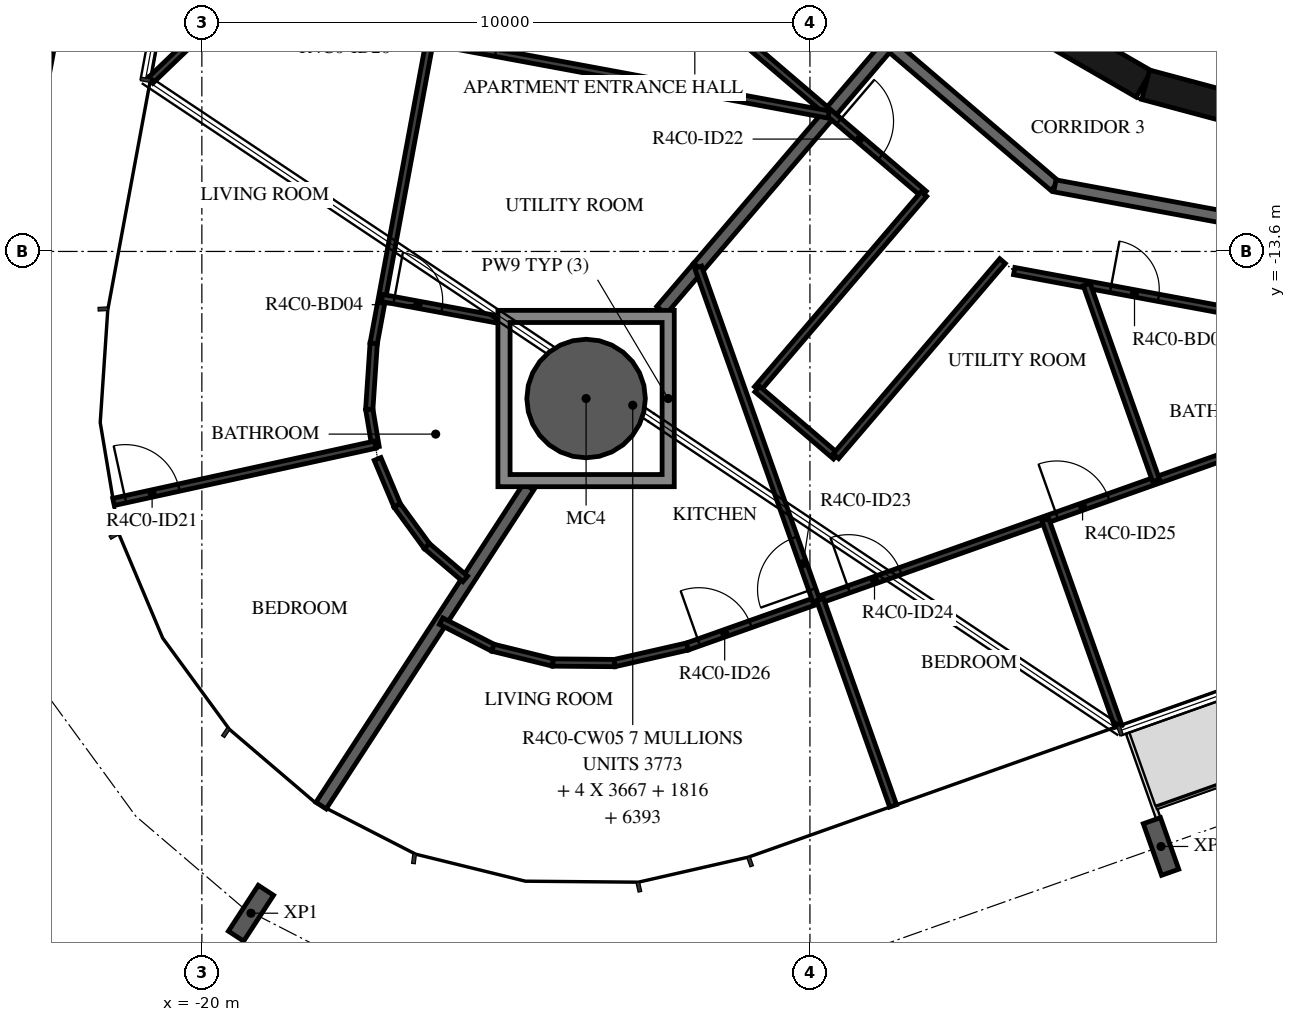
"""IFC4 building model, lengths in metres.
Left out: names, types, materials, properties, quantities, classifications, styles, units other than length and angle.
Written with IfcOpenShell. Run it as: python <this file> out.ifc"""

import sys

from ifc_helpers import new_model, si_unit, direction, frame, frame_2d, origin, origin_2d, place, context, subcontext, project, spatial, polyline, rectangle, hollow_circle, i_section, outline, extrude, element, fill, save


model = new_model("IFC4")
c1 = context("Model", 3, precision=1e-05, world=origin(), true_north=direction((0.0, 1.0)))
c2 = subcontext(c1, "Body", "Model", "MODEL_VIEW")
j1 = project(units=[si_unit("LENGTHUNIT", "METRE"), si_unit("PLANEANGLEUNIT", "RADIAN")], contexts=[c1])
p1 = place(None, origin())
s1 = spatial("IfcSite", under=j1, at=p1, CompositionType="ELEMENT")
p2 = place(p1, origin())
s2 = spatial("IfcBuilding", under=s1, at=p2, CompositionType="ELEMENT")
p3 = place(p2, frame((0.0, 0.0, 179.7)))
s3 = spatial("IfcBuildingStorey", under=s2, at=p3, CompositionType="ELEMENT", Elevation=179.7)
p4 = place(p3, frame((-13.681, -16.019, -0.38), z_axis=(0.0, 0.0, 1.0), x_axis=(1.0, 0.0, 0.0)))
e1 = element("IfcColumn", 1, at=p4, inside=s3, PredefinedType="COLUMN", context=c2, shape_type="SweptSolid", body=[
    extrude(hollow_circle(Radius=0.975, WallThickness=0.045, at=origin_2d()), origin(), (0.0, 0.0, 1.0), 2.616),
])
for number, where, z_axis, x_axis in (
    (2, (-22.914, -10.409, -0.38), (0.0, 0.0, 1.0), (0.182, 0.983, 0.0)),
    (3, (-19.192, -24.483, -0.38), (0.0, 0.0, 1.0), (-0.838, 0.546, 0.0)),
    (4, (-4.226, -23.385, -0.38), (0.0, 0.0, 1.0), (-0.943, -0.334, 0.0)),
):
    element("IfcColumn", number, at=place(p3, frame(where, z_axis=z_axis, x_axis=x_axis)), inside=s3, PredefinedType="COLUMN", context=c2, shape_type="SweptSolid", body=[
        extrude(i_section(OverallWidth=0.3, OverallDepth=0.9, WebThickness=0.019, FlangeThickness=0.035, FilletRadius=0.03, at=origin_2d()), origin(), (0.0, 0.0, 1.0), 2.616),
    ])
for number, where, z_axis, x_axis in (
    (5, (-7.137, -9.329, 0.0), (0.0, 0.0, 1.0), (0.866, -0.5, 0.0)),
    (6, (-4.479, -10.858, 0.0), (0.0, 0.0, 1.0), (0.966, -0.259, 0.0)),
):
    element("IfcWall", number, at=place(p3, frame(where, z_axis=z_axis, x_axis=x_axis)), inside=s3, PredefinedType="SHEAR", context=c2, shape_type="SweptSolid", body=[
        extrude(rectangle(XDim=3.033, YDim=0.5, at=frame_2d((1.516, 0.0))), origin(), (0.0, 0.0, 1.0), 3.05),
    ])
p5 = place(p3, frame((-11.433, -7.858, 0.0), z_axis=(0.0, 0.0, 1.0), x_axis=(0.760412154545, -0.649440801937, 0.0)))
e7 = element("IfcWall", 7, at=p5, inside=s3, PredefinedType="STANDARD", context=c2, shape_type="SweptSolid", body=[
    extrude(rectangle(XDim=7.181, YDim=0.2, at=frame_2d((3.59, 0.0))), origin(), (0.0, 0.0, 1.0), 3.05),
])
p6 = place(p5, frame((2.39, 0.0, 0.0)))
e8 = element("IfcOpeningElement", 8, at=p6, cuts=e7, PredefinedType="OPENING", context=c2, shape_type="SweptSolid", body=[
    extrude(rectangle(XDim=1.0, YDim=2.1, at=frame_2d((0.5, 1.05))), frame((0.0, 0.11, 0.0), z_axis=(0.0, -1.0, 0.0), x_axis=(1.0, 0.0, 0.0)), (0.0, 0.0, 1.0), 0.22),
])
p7 = place(p3, frame((-5.972, -12.521, 0.0), z_axis=(0.0, 0.0, 1.0), x_axis=(0.983256068163, -0.18222926335, 0.0)))
e9 = element("IfcWall", 9, at=p7, inside=s3, PredefinedType="STANDARD", context=c2, shape_type="SweptSolid", body=[
    extrude(rectangle(XDim=7.181, YDim=0.2, at=frame_2d((3.59, 0.0))), origin(), (0.0, 0.0, 1.0), 3.05),
])
p8 = place(p7, frame((4.7, 0.0, 0.0)))
e10 = element("IfcOpeningElement", 10, at=p8, cuts=e9, PredefinedType="OPENING", context=c2, shape_type="SweptSolid", body=[
    extrude(rectangle(XDim=1.0, YDim=2.1, at=frame_2d((0.5, 1.05))), frame((0.0, 0.11, 0.0), z_axis=(0.0, -1.0, 0.0), x_axis=(1.0, 0.0, 0.0)), (0.0, 0.0, 1.0), 0.22),
])
p9 = place(p3, frame((-11.838, -13.86, 0.0), z_axis=(0.0, 0.0, 1.0), x_axis=(0.64944503311, 0.760408540831, 0.0)))
e11 = element("IfcWall", 11, at=p9, inside=s3, PredefinedType="STANDARD", context=c2, shape_type="SweptSolid", body=[
    extrude(rectangle(XDim=4.827, YDim=0.2, at=frame_2d((2.414, 0.0))), origin(), (0.0, 0.0, 1.0), 3.05),
])
p10 = place(p3, frame((-12.443, -14.569, 0.0), z_axis=(0.0, 0.0, 1.0), x_axis=(0.649517408851, 0.760346720648, 0.0)))
e12 = element("IfcWall", 12, at=p10, inside=s3, PredefinedType="STANDARD", context=c2, shape_type="SweptSolid", body=[
    extrude(rectangle(XDim=0.932, YDim=0.2, at=frame_2d((0.466, 0.0))), origin(), (0.0, 0.0, 1.0), 3.05),
])
p11 = place(p3, frame((-18.04, -22.713, 0.0), z_axis=(0.0, 0.0, 1.0), x_axis=(0.545628572271, 0.838027124335, 0.0)))
e13 = element("IfcWall", 13, at=p11, inside=s3, PredefinedType="STANDARD", context=c2, shape_type="SweptSolid", body=[
    extrude(rectangle(XDim=6.258, YDim=0.2, at=frame_2d((3.129, 0.0))), origin(), (0.0, 0.0, 1.0), 3.05),
])
p12 = place(p3, frame((-12.713, -8.737, 0.0), z_axis=(0.0, 0.0, 1.0), x_axis=(0.760432387723, -0.649417110725, 0.0)))
e14 = element("IfcWall", 14, at=p12, inside=s3, PredefinedType="PARTITIONING", context=c2, shape_type="SweptSolid", body=[
    extrude(rectangle(XDim=6.032, YDim=0.12, at=frame_2d((3.016, 0.0))), origin(), (0.0, 0.0, 1.0), 3.05),
])
p13 = place(p12, frame((4.192, 0.0, 0.0)))
e15 = element("IfcOpeningElement", 15, at=p13, cuts=e14, PredefinedType="OPENING", context=c2, shape_type="SweptSolid", body=[
    extrude(rectangle(XDim=0.9, YDim=2.1, at=frame_2d((0.45, 1.05))), frame((0.0, 0.07, 0.0), z_axis=(0.0, -1.0, 0.0), x_axis=(1.0, 0.0, 0.0)), (0.0, 0.0, 1.0), 0.14),
])
p14 = place(p3, frame((-20.849, -10.792, 0.0), z_axis=(0.0, 0.0, 1.0), x_axis=(0.721364983662, 0.692555095531, 0.0)))
e16 = element("IfcWall", 16, at=p14, inside=s3, PredefinedType="PARTITIONING", context=c2, shape_type="SweptSolid", body=[
    extrude(rectangle(XDim=6.771, YDim=0.12, at=frame_2d((3.385, 0.0))), origin(), (0.0, 0.0, 1.0), 3.05),
])
p15 = place(p3, frame((-15.51, -6.13, 0.0), z_axis=(0.0, 0.0, 1.0), x_axis=(-0.182243361628, -0.98325345519, 0.0)))
e17 = element("IfcWall", 17, at=p15, inside=s3, PredefinedType="PARTITIONING", context=c2, shape_type="SweptSolid", body=[
    extrude(rectangle(XDim=9.134, YDim=0.12, at=frame_2d((4.567, 0.0))), origin(), (0.0, 0.0, 1.0), 3.05),
])
p16 = place(p15, frame((0.6, 0.0, 0.0)))
e18 = element("IfcOpeningElement", 18, at=p16, cuts=e17, PredefinedType="OPENING", context=c2, shape_type="SweptSolid", body=[
    extrude(rectangle(XDim=0.9, YDim=2.1, at=frame_2d((0.45, 1.05))), frame((0.0, 0.07, 0.0), z_axis=(0.0, -1.0, 0.0), x_axis=(1.0, 0.0, 0.0)), (0.0, 0.0, 1.0), 0.14),
])
p17 = place(p3, frame((-16.252, -10.133, 0.0), z_axis=(0.0, 0.0, 1.0), x_axis=(0.983256998026, -0.182224246005, 0.0)))
e19 = element("IfcWall", 19, at=p17, inside=s3, PredefinedType="PARTITIONING", context=c2, shape_type="SweptSolid", body=[
    extrude(rectangle(XDim=6.671, YDim=0.12, at=frame_2d((3.335, 0.0))), origin(), (0.0, 0.0, 1.0), 3.05),
])
p18 = place(p17, frame((0.2, 0.0, 0.0)))
e20 = element("IfcOpeningElement", 20, at=p18, cuts=e19, PredefinedType="OPENING", context=c2, shape_type="SweptSolid", body=[
    extrude(rectangle(XDim=0.9, YDim=2.1, at=frame_2d((0.45, 1.05))), frame((0.0, 0.07, 0.0), z_axis=(0.0, -1.0, 0.0), x_axis=(1.0, 0.0, 0.0)), (0.0, 0.0, 1.0), 0.14),
])
p19 = place(p3, frame((-17.143, -16.817, 0.0), z_axis=(0.0, 0.0, 1.0), x_axis=(-0.164964120994, 0.98629956848, 0.0)))
e21 = element("IfcWall", 21, at=p19, inside=s3, PredefinedType="PARTITIONING", context=c2, shape_type="SweptSolid", body=[
    extrude(rectangle(XDim=0.63, YDim=0.12, at=frame_2d((0.315, 0.0))), origin(), (0.0, 0.0, 1.0), 3.05),
])
p20 = place(p3, frame((-17.247, -16.195, 0.0), z_axis=(0.0, 0.0, 1.0), x_axis=(0.066712820538, 0.997772218282, 0.0)))
e22 = element("IfcWall", 22, at=p20, inside=s3, PredefinedType="PARTITIONING", context=c2, shape_type="SweptSolid", body=[
    extrude(rectangle(XDim=1.087, YDim=0.12, at=frame_2d((0.543, 0.0))), origin(), (0.0, 0.0, 1.0), 3.05),
])
p21 = place(p3, frame((-21.453, -17.719, 0.0), z_axis=(0.0, 0.0, 1.0), x_axis=(0.976887361549, 0.213754725903, 0.0)))
e23 = element("IfcWall", 23, at=p21, inside=s3, PredefinedType="PARTITIONING", context=c2, shape_type="SweptSolid", body=[
    extrude(rectangle(XDim=4.405, YDim=0.12, at=frame_2d((2.203, 0.0))), origin(), (0.0, 0.0, 1.0), 3.05),
])
p22 = place(p21, frame((0.2, 0.0, 0.0)))
e24 = element("IfcOpeningElement", 24, at=p22, cuts=e23, PredefinedType="OPENING", context=c2, shape_type="SweptSolid", body=[
    extrude(rectangle(XDim=0.9, YDim=2.1, at=frame_2d((0.45, 1.05))), frame((0.0, 0.07, 0.0), z_axis=(0.0, -1.0, 0.0), x_axis=(1.0, 0.0, 0.0)), (0.0, 0.0, 1.0), 0.14),
])
p23 = place(p3, frame((-17.036, -14.366, 0.0), z_axis=(0.0, 0.0, 1.0), x_axis=(0.983259435886, -0.182211091156, 0.0)))
e25 = element("IfcWall", 25, at=p23, inside=s3, PredefinedType="PARTITIONING", context=c2, shape_type="SweptSolid", body=[
    extrude(rectangle(XDim=1.938, YDim=0.12, at=frame_2d((0.969, 0.0))), origin(), (0.0, 0.0, 1.0), 3.05),
])
p24 = place(p23, frame((0.2, 0.0, 0.0)))
e26 = element("IfcOpeningElement", 26, at=p24, cuts=e25, PredefinedType="OPENING", context=c2, shape_type="SweptSolid", body=[
    extrude(rectangle(XDim=0.8, YDim=2.1, at=frame_2d((0.4, 1.05))), frame((0.0, 0.07, 0.0), z_axis=(0.0, -1.0, 0.0), x_axis=(1.0, 0.0, 0.0)), (0.0, 0.0, 1.0), 0.14),
])
for number, where, z_axis, x_axis in (
    (27, (-17.11, -17.013, 0.0), (0.0, 0.0, 1.0), (0.388, -0.922, 0.0)),
    (28, (-16.788, -17.777, 0.0), (0.0, 0.0, 1.0), (0.59, -0.807, 0.0)),
    (29, (-16.299, -18.446, 0.0), (0.0, 0.0, 1.0), (0.76, -0.649, 0.0)),
):
    element("IfcWall", number, at=place(p3, frame(where, z_axis=z_axis, x_axis=x_axis)), inside=s3, PredefinedType="PARTITIONING", context=c2, shape_type="SweptSolid", body=[
        extrude(rectangle(XDim=0.829, YDim=0.12, at=frame_2d((0.415, 0.0))), origin(), (0.0, 0.0, 1.0), 3.05),
    ])
p25 = place(p3, frame((-8.125, -12.655, 0.0), z_axis=(0.0, 0.0, 1.0), x_axis=(-0.649441944702, -0.760411178549, 0.0)))
e30 = element("IfcWall", 30, at=p25, inside=s3, PredefinedType="PARTITIONING", context=c2, shape_type="SweptSolid", body=[
    extrude(rectangle(XDim=4.22, YDim=0.12, at=frame_2d((2.11, 0.0))), origin(), (0.0, 0.0, 1.0), 3.05),
])
p26 = place(p3, frame((-10.866, -15.864, 0.0), z_axis=(0.0, 0.0, 1.0), x_axis=(0.760431300628, -0.649418383652, 0.0)))
e31 = element("IfcWall", 31, at=p26, inside=s3, PredefinedType="PARTITIONING", context=c2, shape_type="SweptSolid", body=[
    extrude(rectangle(XDim=1.7, YDim=0.12, at=frame_2d((0.85, 0.0))), origin(), (0.0, 0.0, 1.0), 3.05),
])
p27 = place(p3, frame((-9.573, -16.968, 0.0), z_axis=(0.0, 0.0, 1.0), x_axis=(0.649437062208, 0.760415348498, 0.0)))
e32 = element("IfcWall", 32, at=p27, inside=s3, PredefinedType="PARTITIONING", context=c2, shape_type="SweptSolid", body=[
    extrude(rectangle(XDim=4.219, YDim=0.12, at=frame_2d((2.11, 0.0))), origin(), (0.0, 0.0, 1.0), 3.05),
])
p28 = place(p3, frame((-6.641, -13.923, 0.0), z_axis=(0.0, 0.0, 1.0), x_axis=(0.983250157272, -0.182261153912, 0.0)))
e33 = element("IfcWall", 33, at=p28, inside=s3, PredefinedType="PARTITIONING", context=c2, shape_type="SweptSolid", body=[
    extrude(rectangle(XDim=7.985, YDim=0.12, at=frame_2d((3.992, 0.0))), origin(), (0.0, 0.0, 1.0), 3.05),
])
p29 = place(p28, frame((1.612, 0.0, 0.0)))
e34 = element("IfcOpeningElement", 34, at=p29, cuts=e33, PredefinedType="OPENING", context=c2, shape_type="SweptSolid", body=[
    extrude(rectangle(XDim=0.8, YDim=2.1, at=frame_2d((0.4, 1.05))), frame((0.0, 0.07, 0.0), z_axis=(0.0, -1.0, 0.0), x_axis=(1.0, 0.0, 0.0)), (0.0, 0.0, 1.0), 0.14),
])
p30 = place(p3, frame((-16.065, -19.68, 0.0), z_axis=(0.0, 0.0, 1.0), x_axis=(0.889684645268, -0.456575549033, 0.0)))
e35 = element("IfcWall", 35, at=p30, inside=s3, PredefinedType="PARTITIONING", context=c2, shape_type="SweptSolid", body=[
    extrude(rectangle(XDim=0.957, YDim=0.12, at=frame_2d((0.479, 0.0))), origin(), (0.0, 0.0, 1.0), 3.05),
])
p31 = place(p3, frame((-15.214, -20.117, 0.0), z_axis=(0.0, 0.0, 1.0), x_axis=(0.970998575146, -0.239085271534, 0.0)))
e36 = element("IfcWall", 36, at=p31, inside=s3, PredefinedType="PARTITIONING", context=c2, shape_type="SweptSolid", body=[
    extrude(rectangle(XDim=1.016, YDim=0.12, at=frame_2d((0.508, 0.0))), origin(), (0.0, 0.0, 1.0), 3.05),
])
p32 = place(p3, frame((-14.227, -20.36, 0.0), z_axis=(0.0, 0.0, 1.0), x_axis=(0.999960467683, -0.008891741722, 0.0)))
e37 = element("IfcWall", 37, at=p32, inside=s3, PredefinedType="PARTITIONING", context=c2, shape_type="SweptSolid", body=[
    extrude(rectangle(XDim=1.016, YDim=0.12, at=frame_2d((0.508, 0.0))), origin(), (0.0, 0.0, 1.0), 3.05),
])
p33 = place(p3, frame((-13.211, -20.369, 0.0), z_axis=(0.0, 0.0, 1.0), x_axis=(0.974997834831, 0.222214360642, 0.0)))
e38 = element("IfcWall", 38, at=p33, inside=s3, PredefinedType="PARTITIONING", context=c2, shape_type="SweptSolid", body=[
    extrude(rectangle(XDim=1.227, YDim=0.12, at=frame_2d((0.614, 0.0))), origin(), (0.0, 0.0, 1.0), 3.05),
])
p34 = place(p3, frame((-12.015, -20.096, 0.0), z_axis=(0.0, 0.0, 1.0), x_axis=(0.942638913957, 0.33381413675, 0.0)))
e39 = element("IfcWall", 39, at=p34, inside=s3, PredefinedType="PARTITIONING", context=c2, shape_type="SweptSolid", body=[
    extrude(rectangle(XDim=14.104, YDim=0.12, at=frame_2d((7.052, 0.0))), origin(), (0.0, 0.0, 1.0), 3.05),
])
p35 = place(p34, frame((2.814, 0.0, 0.0)))
e40 = element("IfcOpeningElement", 40, at=p35, cuts=e39, PredefinedType="OPENING", context=c2, shape_type="SweptSolid", body=[
    extrude(rectangle(XDim=0.9, YDim=2.1, at=frame_2d((0.45, 1.05))), frame((0.0, 0.07, 0.0), z_axis=(0.0, -1.0, 0.0), x_axis=(1.0, 0.0, 0.0)), (0.0, 0.0, 1.0), 0.14),
])
p36 = place(p34, frame((6.444, 0.0, 0.0)))
e41 = element("IfcOpeningElement", 41, at=p36, cuts=e39, PredefinedType="OPENING", context=c2, shape_type="SweptSolid", body=[
    extrude(rectangle(XDim=0.9, YDim=2.1, at=frame_2d((0.45, 1.05))), frame((0.0, 0.07, 0.0), z_axis=(0.0, -1.0, 0.0), x_axis=(1.0, 0.0, 0.0)), (0.0, 0.0, 1.0), 0.14),
])
p37 = place(p34, frame((0.2, 0.0, 0.0)))
e42 = element("IfcOpeningElement", 42, at=p37, cuts=e39, PredefinedType="OPENING", context=c2, shape_type="SweptSolid", body=[
    extrude(rectangle(XDim=0.9, YDim=2.1, at=frame_2d((0.45, 1.05))), frame((0.0, 0.07, 0.0), z_axis=(0.0, -1.0, 0.0), x_axis=(1.0, 0.0, 0.0)), (0.0, 0.0, 1.0), 0.14),
])
p38 = place(p3, frame((-9.895, -19.346, 0.0), z_axis=(0.0, 0.0, 1.0), x_axis=(-0.333781129158, 0.942650602195, 0.0)))
e43 = element("IfcWall", 43, at=p38, inside=s3, PredefinedType="PARTITIONING", context=c2, shape_type="SweptSolid", body=[
    extrude(rectangle(XDim=5.819, YDim=0.12, at=frame_2d((2.91, 0.0))), origin(), (0.0, 0.0, 1.0), 3.05),
])
p39 = place(p38, frame((0.2, 0.0, 0.0)))
e44 = element("IfcOpeningElement", 44, at=p39, cuts=e43, PredefinedType="OPENING", context=c2, shape_type="SweptSolid", body=[
    extrude(rectangle(XDim=0.9, YDim=2.1, at=frame_2d((0.45, 1.05))), frame((0.0, 0.07, 0.0), z_axis=(0.0, -1.0, 0.0), x_axis=(1.0, 0.0, 0.0)), (0.0, 0.0, 1.0), 0.14),
])
p40 = place(p3, frame((-8.632, -22.718, 0.0), z_axis=(0.0, 0.0, 1.0), x_axis=(-0.333791905243, 0.942646786445, 0.0)))
e45 = element("IfcWall", 45, at=p40, inside=s3, PredefinedType="PARTITIONING", context=c2, shape_type="SweptSolid", body=[
    extrude(rectangle(XDim=3.6, YDim=0.12, at=frame_2d((1.8, 0.0))), origin(), (0.0, 0.0, 1.0), 3.05),
])
p41 = place(p3, frame((-4.308, -17.367, 0.0), z_axis=(0.0, 0.0, 1.0), x_axis=(-0.333802202677, 0.942643140052, 0.0)))
e46 = element("IfcWall", 46, at=p41, inside=s3, PredefinedType="PARTITIONING", context=c2, shape_type="SweptSolid", body=[
    extrude(rectangle(XDim=3.419, YDim=0.12, at=frame_2d((1.709, 0.0))), origin(), (0.0, 0.0, 1.0), 3.05),
])
p42 = place(p3, frame((-4.927, -21.406, 0.0), z_axis=(0.0, 0.0, 1.0), x_axis=(-0.333813244781, 0.942639229827, 0.0)))
e47 = element("IfcWall", 47, at=p42, inside=s3, PredefinedType="PARTITIONING", context=c2, shape_type="SweptSolid", body=[
    extrude(rectangle(XDim=3.6, YDim=0.12, at=frame_2d((1.8, 0.0))), origin(), (0.0, 0.0, 1.0), 3.05),
])
p43 = place(p3, origin())
e48 = element("IfcWall", 48, at=p43, inside=s3, PredefinedType="STANDARD", context=c2, shape_type="SweptSolid", body=[
    extrude(outline(polyline([(-12.231, -14.569), (-12.231, -17.469), (-15.131, -17.469), (-15.131, -14.569), (-12.231, -14.569)]), holes=[polyline([(-14.931, -17.269), (-12.431, -17.269), (-12.431, -14.769), (-14.931, -14.769), (-14.931, -17.269)])]), origin(), (0.0, 0.0, 1.0), 3.05),
])
p44 = place(p18, origin())
e49 = element("IfcDoor", 49, at=p44, inside=s3, OperationType="SINGLE_SWING_RIGHT", PredefinedType="DOOR", context=c2, shape_type="SweptSolid", body=[
    extrude(rectangle(XDim=0.9, YDim=2.1, at=frame_2d((0.45, 1.05))), frame((0.0, 0.025, 0.0), z_axis=(0.0, -1.0, 0.0), x_axis=(1.0, 0.0, 0.0)), (0.0, 0.0, 1.0), 0.05),
])
fill(e20, e49)
p45 = place(p24, origin())
e50 = element("IfcDoor", 50, at=p45, inside=s3, OperationType="SINGLE_SWING_RIGHT", PredefinedType="DOOR", context=c2, shape_type="SweptSolid", body=[
    extrude(rectangle(XDim=0.8, YDim=2.1, at=frame_2d((0.4, 1.05))), frame((0.0, 0.025, 0.0), z_axis=(0.0, -1.0, 0.0), x_axis=(1.0, 0.0, 0.0)), (0.0, 0.0, 1.0), 0.05),
])
fill(e26, e50)
p46 = place(p22, origin())
e51 = element("IfcDoor", 51, at=p46, inside=s3, OperationType="SINGLE_SWING_RIGHT", PredefinedType="DOOR", context=c2, shape_type="SweptSolid", body=[
    extrude(rectangle(XDim=0.9, YDim=2.1, at=frame_2d((0.45, 1.05))), frame((0.0, 0.025, 0.0), z_axis=(0.0, -1.0, 0.0), x_axis=(1.0, 0.0, 0.0)), (0.0, 0.0, 1.0), 0.05),
])
fill(e24, e51)
p47 = place(p13, origin())
e52 = element("IfcDoor", 52, at=p47, inside=s3, OperationType="SINGLE_SWING_LEFT", PredefinedType="DOOR", context=c2, shape_type="SweptSolid", body=[
    extrude(rectangle(XDim=0.9, YDim=2.1, at=frame_2d((0.45, 1.05))), frame((0.0, 0.025, 0.0), z_axis=(0.0, -1.0, 0.0), x_axis=(1.0, 0.0, 0.0)), (0.0, 0.0, 1.0), 0.05),
])
fill(e15, e52)
p48 = place(p29, origin())
e53 = element("IfcDoor", 53, at=p48, inside=s3, OperationType="SINGLE_SWING_LEFT", PredefinedType="DOOR", context=c2, shape_type="SweptSolid", body=[
    extrude(rectangle(XDim=0.8, YDim=2.1, at=frame_2d((0.4, 1.05))), frame((0.0, 0.025, 0.0), z_axis=(0.0, -1.0, 0.0), x_axis=(1.0, 0.0, 0.0)), (0.0, 0.0, 1.0), 0.05),
])
fill(e34, e53)
p49 = place(p39, origin())
e54 = element("IfcDoor", 54, at=p49, inside=s3, OperationType="SINGLE_SWING_LEFT", PredefinedType="DOOR", context=c2, shape_type="SweptSolid", body=[
    extrude(rectangle(XDim=0.9, YDim=2.1, at=frame_2d((0.45, 1.05))), frame((0.0, 0.025, 0.0), z_axis=(0.0, -1.0, 0.0), x_axis=(1.0, 0.0, 0.0)), (0.0, 0.0, 1.0), 0.05),
])
fill(e44, e54)
p50 = place(p35, origin())
e55 = element("IfcDoor", 55, at=p50, inside=s3, OperationType="SINGLE_SWING_LEFT", PredefinedType="DOOR", context=c2, shape_type="SweptSolid", body=[
    extrude(rectangle(XDim=0.9, YDim=2.1, at=frame_2d((0.45, 1.05))), frame((0.0, 0.025, 0.0), z_axis=(0.0, -1.0, 0.0), x_axis=(1.0, 0.0, 0.0)), (0.0, 0.0, 1.0), 0.05),
])
fill(e40, e55)
p51 = place(p36, origin())
e56 = element("IfcDoor", 56, at=p51, inside=s3, OperationType="SINGLE_SWING_LEFT", PredefinedType="DOOR", context=c2, shape_type="SweptSolid", body=[
    extrude(rectangle(XDim=0.9, YDim=2.1, at=frame_2d((0.45, 1.05))), frame((0.0, 0.025, 0.0), z_axis=(0.0, -1.0, 0.0), x_axis=(1.0, 0.0, 0.0)), (0.0, 0.0, 1.0), 0.05),
])
fill(e41, e56)
p52 = place(p37, origin())
e57 = element("IfcDoor", 57, at=p52, inside=s3, OperationType="SINGLE_SWING_RIGHT", PredefinedType="DOOR", context=c2, shape_type="SweptSolid", body=[
    extrude(rectangle(XDim=0.9, YDim=2.1, at=frame_2d((0.45, 1.05))), frame((0.0, 0.025, 0.0), z_axis=(0.0, -1.0, 0.0), x_axis=(1.0, 0.0, 0.0)), (0.0, 0.0, 1.0), 0.05),
])
fill(e42, e57)
save(model, sys.argv[1])
